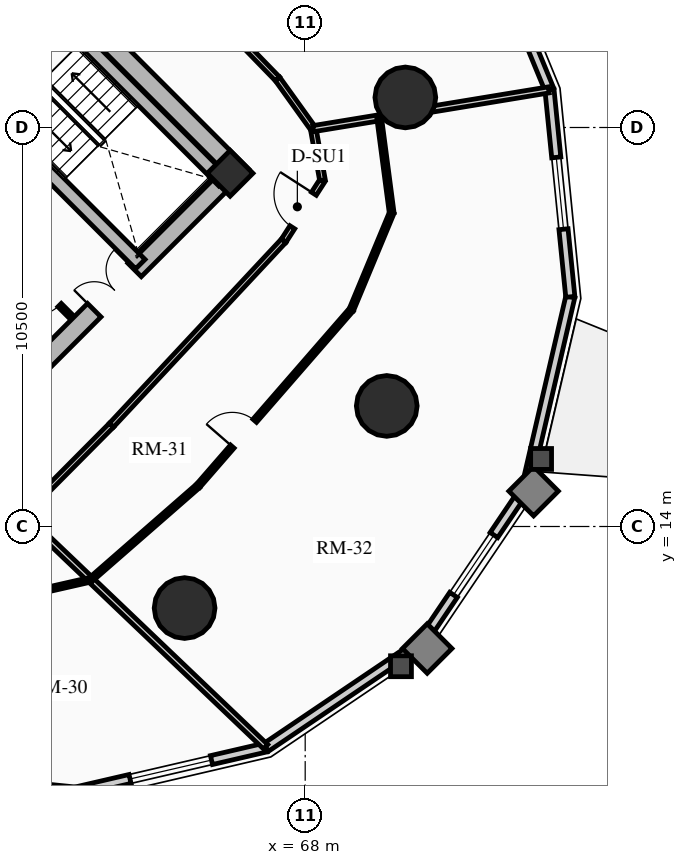
"""IFC4 building model, lengths in metres.
Left out: names, types, materials, properties, quantities, classifications, styles, units other than length and angle.
Written with IfcOpenShell. Run it as: python <this file> out.ifc"""

import sys

from ifc_helpers import new_model, si_unit, direction, frame, frame_2d, origin, origin_2d, place, context, subcontext, project, spatial, rectangle, circle, extrude, source, transform, mapped, element, fill, save


model = new_model("IFC4")
c1 = context("Model", 3, precision=1e-05, world=origin(), true_north=direction((0.0, 1.0)))
c2 = subcontext(c1, "Body", "Model", "MODEL_VIEW")
j1 = project(units=[si_unit("LENGTHUNIT", "METRE"), si_unit("PLANEANGLEUNIT", "RADIAN")], contexts=[c1])
p1 = place(None, origin())
s1 = spatial("IfcSite", under=j1, at=p1, CompositionType="ELEMENT")
p2 = place(p1, origin())
s2 = spatial("IfcBuilding", under=s1, at=p2, CompositionType="ELEMENT")
p3 = place(p2, frame((0.0, 0.0, 56.92)))
s3 = spatial("IfcBuildingStorey", under=s2, at=p3, CompositionType="ELEMENT", Elevation=56.92)
p4 = place(p3, frame((66.339, 23.227, 0.0), z_axis=(0.0, 0.0, 1.0), x_axis=(-0.707106781187, 0.707106781187, 0.0)))
e1 = element("IfcWall", 1, at=p4, inside=s3, PredefinedType="SHEAR", context=c2, shape_type="SweptSolid", body=[
    extrude(rectangle(XDim=14.3, YDim=0.5, at=frame_2d((7.15, 0.0))), origin(), (0.0, 0.0, 1.0), 2.91),
])
p5 = place(p3, frame((58.596, 15.838, 0.0), z_axis=(0.0, 0.0, 1.0), x_axis=(0.707106781187, 0.707106781187, 0.0)))
e2 = element("IfcWall", 2, at=p5, inside=s3, PredefinedType="SHEAR", context=c2, shape_type="SweptSolid", body=[
    extrude(rectangle(XDim=10.7, YDim=0.5, at=frame_2d((5.35, 0.0))), origin(), (0.0, 0.0, 1.0), 2.91),
])
m1 = source(origin(), c2, "Body", "SweptSolid", [
    extrude(rectangle(XDim=1.5, YDim=2.02, at=frame_2d((0.75, 1.01))), frame((0.0, 0.26, 0.0), z_axis=(0.0, -1.0, 0.0), x_axis=(1.0, 0.0, 0.0)), (0.0, 0.0, 1.0), 0.52),
])
p6 = place(p5, frame((5.45, 0.0, 0.0)))
e3 = element("IfcOpeningElement", 3, at=p6, cuts=e2, PredefinedType="OPENING", context=c2, shape_type="MappedRepresentation", body=[
    mapped(m1, transform((0.0, 0.0, 0.0), x_axis=(1.0, 0.0, 0.0), y_axis=(0.0, 1.0, 0.0), z_axis=(0.0, 0.0, 1.0), scale=1.0)),
])
p7 = place(p3, frame((63.662, 20.904, 0.0), z_axis=(0.0, 0.0, 1.0), x_axis=(-0.707106781187, 0.707106781187, 0.0)))
e4 = element("IfcWall", 4, at=p7, inside=s3, PredefinedType="SHEAR", context=c2, shape_type="SweptSolid", body=[
    extrude(rectangle(XDim=13.8, YDim=0.35, at=frame_2d((6.9, 0.0))), origin(), (0.0, 0.0, 1.0), 2.91),
])
m2 = source(origin(), c2, "Body", "SweptSolid", [
    extrude(rectangle(XDim=1.1, YDim=2.015, at=frame_2d((0.55, 1.007))), frame((0.0, 0.185, 0.0), z_axis=(0.0, -1.0, 0.0), x_axis=(1.0, 0.0, 0.0)), (0.0, 0.0, 1.0), 0.37),
])
p8 = place(p7, frame((10.025, 0.0, 0.0)))
e5 = element("IfcOpeningElement", 5, at=p8, cuts=e4, PredefinedType="OPENING", context=c2, shape_type="MappedRepresentation", body=[
    mapped(m2, transform((0.0, 0.0, 0.0), x_axis=(1.0, 0.0, 0.0), y_axis=(0.0, 1.0, 0.0), z_axis=(0.0, 0.0, 1.0), scale=1.0)),
])
p9 = place(p7, frame((12.025, 0.0, 0.0)))
e6 = element("IfcOpeningElement", 6, at=p9, cuts=e4, PredefinedType="OPENING", context=c2, shape_type="MappedRepresentation", body=[
    mapped(m2, transform((0.0, 0.0, 0.0), x_axis=(1.0, 0.0, 0.0), y_axis=(0.0, 1.0, 0.0), z_axis=(0.0, 0.0, 1.0), scale=1.0)),
])
m3 = source(origin(), c2, "Body", "SweptSolid", [
    extrude(rectangle(XDim=1.15, YDim=2.02, at=frame_2d((0.575, 1.01))), frame((0.0, 0.185, 0.0), z_axis=(0.0, -1.0, 0.0), x_axis=(1.0, 0.0, 0.0)), (0.0, 0.0, 1.0), 0.37),
])
p10 = place(p7, frame((5.33, 0.0, 0.0)))
e7 = element("IfcOpeningElement", 7, at=p10, cuts=e4, PredefinedType="OPENING", context=c2, shape_type="MappedRepresentation", body=[
    mapped(m3, transform((0.0, 0.0, 0.0), x_axis=(1.0, 0.0, 0.0), y_axis=(0.0, 1.0, 0.0), z_axis=(0.0, 0.0, 1.0), scale=1.0)),
])
p11 = place(p3, frame((65.847, 23.089, 0.0), z_axis=(0.0, 0.0, 1.0), x_axis=(-0.707106781187, 0.707106781187, 0.0)))
e8 = element("IfcWall", 8, at=p11, inside=s3, PredefinedType="SHEAR", context=c2, shape_type="SweptSolid", body=[
    extrude(rectangle(XDim=6.745, YDim=0.35, at=frame_2d((3.373, 0.0))), origin(), (0.0, 0.0, 1.0), 2.91),
])
p12 = place(p3, frame((66.024, 23.294, 0.0), z_axis=(0.0, 0.0, 1.0), x_axis=(0.707106781187, 0.707106781187, 0.0)))
e9 = element("IfcColumn", 9, at=p12, inside=s3, PredefinedType="COLUMN", context=c2, shape_type="SweptSolid", body=[
    extrude(rectangle(XDim=0.85, YDim=0.85, at=origin_2d()), origin(), (0.0, 0.0, 1.0), 2.91),
])
for number, where, z_axis, x_axis in (
    (10, (64.827, 11.854, 0.0), (0.0, 0.0, 1.0), (1.0, 0.0, 0.0)),
    (11, (70.146, 17.173, 0.0), (0.0, 0.0, 1.0), (1.0, 0.0, 0.0)),
    (12, (70.635, 25.291, 0.0), (0.0, 0.0, 1.0), (1.0, 0.0, 0.0)),
):
    element("IfcColumn", number, at=place(p3, frame(where, z_axis=z_axis, x_axis=x_axis)), inside=s3, PredefinedType="USERDEFINED", context=c2, shape_type="SweptSolid", body=[
        extrude(circle(Radius=0.8, at=origin_2d()), origin(), (0.0, 0.0, 1.0), 2.91),
    ])
p13 = place(p3, frame((61.957, 7.024, 0.0), z_axis=(0.0, 0.0, 1.0), x_axis=(-0.994970765694, 0.100165739718, 0.0)))
e13 = element("IfcWall", 13, at=p13, inside=s3, PredefinedType="SOLIDWALL", context=c2, shape_type="SweptSolid", body=[
    extrude(rectangle(XDim=5.477, YDim=0.24, at=frame_2d((2.738, 0.0))), origin(), (0.0, 0.0, 1.0), 2.073),
])
m4 = source(origin(), c2, "Body", "SweptSolid", [
    extrude(rectangle(XDim=1.9, YDim=1.35, at=frame_2d((0.95, 0.675))), frame((0.0, 0.13, 0.0), z_axis=(0.0, -1.0, 0.0), x_axis=(1.0, 0.0, 0.0)), (0.0, 0.0, 1.0), 0.26),
])
p14 = place(p13, frame((1.788, 0.0, 0.65)))
e14 = element("IfcOpeningElement", 14, at=p14, cuts=e13, PredefinedType="OPENING", context=c2, shape_type="MappedRepresentation", body=[
    mapped(m4, transform((0.0, 0.0, 0.0), x_axis=(1.0, 0.0, 0.0), y_axis=(0.0, 1.0, 0.0), z_axis=(0.0, 0.0, 1.0), scale=1.0)),
])
p15 = place(p3, frame((66.969, 8.186, 0.0), z_axis=(0.0, 0.0, 1.0), x_axis=(-0.974166016949, -0.225833060959, 0.0)))
e15 = element("IfcWall", 15, at=p15, inside=s3, PredefinedType="SOLIDWALL", context=c2, shape_type="SweptSolid", body=[
    extrude(rectangle(XDim=5.146, YDim=0.24, at=frame_2d((2.573, 0.0))), origin(), (0.0, 0.0, 1.0), 2.073),
])
m5 = source(origin(), c2, "Body", "SweptSolid", [
    extrude(rectangle(XDim=2.2, YDim=1.35, at=frame_2d((1.1, 0.675))), frame((0.0, 0.13, 0.0), z_axis=(0.0, -1.0, 0.0), x_axis=(1.0, 0.0, 0.0)), (0.0, 0.0, 1.0), 0.26),
])
p16 = place(p15, frame((1.473, 0.0, 0.65)))
e16 = element("IfcOpeningElement", 16, at=p16, cuts=e15, PredefinedType="OPENING", context=c2, shape_type="MappedRepresentation", body=[
    mapped(m5, transform((0.0, 0.0, 0.0), x_axis=(1.0, 0.0, 0.0), y_axis=(0.0, 1.0, 0.0), z_axis=(0.0, 0.0, 1.0), scale=1.0)),
])
p17 = place(p3, frame((71.055, 10.945, 0.0), z_axis=(0.0, 0.0, 1.0), x_axis=(-0.828736708604, -0.559638693991, 0.0)))
e17 = element("IfcWall", 17, at=p17, inside=s3, PredefinedType="SOLIDWALL", context=c2, shape_type="SweptSolid", body=[
    extrude(rectangle(XDim=4.93, YDim=0.24, at=frame_2d((2.465, 0.0))), origin(), (0.0, 0.0, 1.0), 2.073),
])
p18 = place(p3, frame((73.814, 15.031, 0.0), z_axis=(0.0, 0.0, 1.0), x_axis=(-0.559638693991, -0.828736708604, 0.0)))
e18 = element("IfcWall", 18, at=p18, inside=s3, PredefinedType="SOLIDWALL", context=c2, shape_type="SweptSolid", body=[
    extrude(rectangle(XDim=4.93, YDim=0.24, at=frame_2d((2.465, 0.0))), origin(), (0.0, 0.0, 1.0), 2.073),
])
p19 = place(p18, frame((1.515, 0.0, 0.65)))
e19 = element("IfcOpeningElement", 19, at=p19, cuts=e18, PredefinedType="OPENING", context=c2, shape_type="MappedRepresentation", body=[
    mapped(m4, transform((0.0, 0.0, 0.0), x_axis=(1.0, 0.0, 0.0), y_axis=(0.0, 1.0, 0.0), z_axis=(0.0, 0.0, 1.0), scale=1.0)),
])
p20 = place(p3, frame((74.976, 20.043, 0.0), z_axis=(0.0, 0.0, 1.0), x_axis=(-0.225833060959, -0.974166016949, 0.0)))
e20 = element("IfcWall", 20, at=p20, inside=s3, PredefinedType="SOLIDWALL", context=c2, shape_type="SweptSolid", body=[
    extrude(rectangle(XDim=5.146, YDim=0.24, at=frame_2d((2.573, 0.0))), origin(), (0.0, 0.0, 1.0), 2.073),
])
p21 = place(p3, frame((74.428, 25.493, 0.0), z_axis=(0.0, 0.0, 1.0), x_axis=(0.100165739718, -0.994970765694, 0.0)))
e21 = element("IfcWall", 21, at=p21, inside=s3, PredefinedType="SOLIDWALL", context=c2, shape_type="SweptSolid", body=[
    extrude(rectangle(XDim=5.477, YDim=0.24, at=frame_2d((2.738, 0.0))), origin(), (0.0, 0.0, 1.0), 2.073),
])
p22 = place(p21, frame((1.788, 0.0, 0.65)))
e22 = element("IfcOpeningElement", 22, at=p22, cuts=e21, PredefinedType="OPENING", context=c2, shape_type="MappedRepresentation", body=[
    mapped(m4, transform((0.0, 0.0, 0.0), x_axis=(1.0, 0.0, 0.0), y_axis=(0.0, 1.0, 0.0), z_axis=(0.0, 0.0, 1.0), scale=1.0)),
])
p23 = place(p3, frame((72.222, 30.844, 0.0), z_axis=(0.0, 0.0, 1.0), x_axis=(0.381027682565, -0.924563629567, 0.0)))
e23 = element("IfcWall", 23, at=p23, inside=s3, PredefinedType="SOLIDWALL", context=c2, shape_type="SweptSolid", body=[
    extrude(rectangle(XDim=5.789, YDim=0.24, at=frame_2d((2.894, 0.0))), origin(), (0.0, 0.0, 1.0), 2.073),
])
p24 = place(p3, frame((61.835, 19.529, 0.0), z_axis=(0.0, 0.0, 1.0), x_axis=(-0.707174592913, 0.707038962956, 0.0)))
e24 = element("IfcWall", 24, at=p24, inside=s3, PredefinedType="PARTITIONING", context=c2, shape_type="SweptSolid", body=[
    extrude(rectangle(XDim=1.8, YDim=0.125, at=frame_2d((0.9, 0.0))), origin(), (0.0, 0.0, 1.0), 2.635),
])
m6 = source(origin(), c2, "Body", "SweptSolid", [
    extrude(rectangle(XDim=0.9, YDim=2.005, at=frame_2d((0.45, 1.002))), frame((0.0, 0.073, 0.0), z_axis=(0.0, -1.0, 0.0), x_axis=(1.0, 0.0, 0.0)), (0.0, 0.0, 1.0), 0.145),
])
p25 = place(p24, frame((0.42, 0.0, 0.0)))
e25 = element("IfcOpeningElement", 25, at=p25, cuts=e24, PredefinedType="OPENING", context=c2, shape_type="MappedRepresentation", body=[
    mapped(m6, transform((0.0, 0.0, 0.0), x_axis=(1.0, 0.0, 0.0), y_axis=(0.0, 1.0, 0.0), z_axis=(0.0, 0.0, 1.0), scale=1.0)),
])
p26 = place(p3, frame((60.562, 14.31, 0.0), z_axis=(0.0, 0.0, 1.0), x_axis=(0.704566236161, 0.709638230975, 0.0)))
e26 = element("IfcWall", 26, at=p26, inside=s3, PredefinedType="PARTITIONING", context=c2, shape_type="SweptSolid", body=[
    extrude(rectangle(XDim=3.321, YDim=0.15, at=frame_2d((1.661, 0.0))), origin(), (0.0, 0.0, 1.0), 2.159),
])
p27 = place(p3, frame((62.903, 16.667, 0.0), z_axis=(0.0, 0.0, 1.0), x_axis=(0.682371947497, 0.731005147225, 0.0)))
e27 = element("IfcWall", 27, at=p27, inside=s3, PredefinedType="PARTITIONING", context=c2, shape_type="SweptSolid", body=[
    extrude(rectangle(XDim=6.642, YDim=0.15, at=frame_2d((3.321, 0.0))), origin(), (0.0, 0.0, 1.0), 2.159),
])
p28 = place(p3, frame((67.435, 21.521, 0.0), z_axis=(0.0, 0.0, 1.0), x_axis=(0.540777197838, 0.841165870859, 0.0)))
e28 = element("IfcWall", 28, at=p28, inside=s3, PredefinedType="PARTITIONING", context=c2, shape_type="SweptSolid", body=[
    extrude(rectangle(XDim=1.888, YDim=0.15, at=frame_2d((0.944, 0.0))), origin(), (0.0, 0.0, 1.0), 2.205),
])
m7 = source(origin(), c2, "Body", "SweptSolid", [
    extrude(rectangle(XDim=1.05, YDim=2.015, at=frame_2d((0.525, 1.007))), frame((0.0, 0.085, 0.0), z_axis=(0.0, -1.0, 0.0), x_axis=(1.0, 0.0, 0.0)), (0.0, 0.0, 1.0), 0.17),
])
p29 = place(p28, frame((0.419, 0.0, 0.0)))
e29 = element("IfcOpeningElement", 29, at=p29, cuts=e28, PredefinedType="OPENING", context=c2, shape_type="MappedRepresentation", body=[
    mapped(m7, transform((0.0, 0.0, 0.0), x_axis=(1.0, 0.0, 0.0), y_axis=(0.0, 1.0, 0.0), z_axis=(0.0, 0.0, 1.0), scale=1.0)),
])
p30 = place(p3, frame((68.456, 23.11, 0.0), z_axis=(0.0, 0.0, 1.0), x_axis=(-0.1772522795, 0.984165448191, 0.0)))
e30 = element("IfcWall", 30, at=p30, inside=s3, PredefinedType="PARTITIONING", context=c2, shape_type="SweptSolid", body=[
    extrude(rectangle(XDim=1.382, YDim=0.15, at=frame_2d((0.691, 0.0))), origin(), (0.0, 0.0, 1.0), 2.159),
])
p31 = place(p3, frame((68.211, 24.469, 0.0), z_axis=(0.0, 0.0, 1.0), x_axis=(-0.583012141368, 0.812463441034, 0.0)))
e31 = element("IfcWall", 31, at=p31, inside=s3, PredefinedType="PARTITIONING", context=c2, shape_type="SweptSolid", body=[
    extrude(rectangle(XDim=1.613, YDim=0.15, at=frame_2d((0.807, 0.0))), origin(), (0.0, 0.0, 1.0), 2.205),
])
p32 = place(p3, frame((67.27, 25.78, 0.0), z_axis=(0.0, 0.0, 1.0), x_axis=(-0.696847842907, 0.717218992942, 0.0)))
e32 = element("IfcWall", 32, at=p32, inside=s3, PredefinedType="PARTITIONING", context=c2, shape_type="SweptSolid", body=[
    extrude(rectangle(XDim=6.004, YDim=0.15, at=frame_2d((3.002, 0.0))), origin(), (0.0, 0.0, 1.0), 2.635),
])
m8 = source(origin(), c2, "Body", "SweptSolid", [
    extrude(rectangle(XDim=1.0, YDim=2.015, at=frame_2d((0.5, 1.007))), frame((0.0, 0.085, 0.0), z_axis=(0.0, -1.0, 0.0), x_axis=(1.0, 0.0, 0.0)), (0.0, 0.0, 1.0), 0.17),
])
p33 = place(p32, frame((2.502, 0.0, 0.0)))
e33 = element("IfcOpeningElement", 33, at=p33, cuts=e32, PredefinedType="OPENING", context=c2, shape_type="MappedRepresentation", body=[
    mapped(m8, transform((0.0, 0.0, 0.0), x_axis=(1.0, 0.0, 0.0), y_axis=(0.0, 1.0, 0.0), z_axis=(0.0, 0.0, 1.0), scale=1.0)),
])
p34 = place(p3, frame((60.562, 14.31, 0.0), z_axis=(0.0, 0.0, 1.0), x_axis=(0.723408813637, -0.690419936236, 0.0)))
e34 = element("IfcWall", 34, at=p34, inside=s3, PredefinedType="PARTITIONING", context=c2, shape_type="SweptSolid", body=[
    extrude(rectangle(XDim=8.844, YDim=0.16, at=frame_2d((4.422, 0.0))), origin(), (0.0, 0.0, 1.0), 2.073),
])
p35 = place(p3, frame((68.211, 24.469, 0.0), z_axis=(0.0, 0.0, 1.0), x_axis=(0.986718695255, 0.162438346562, 0.0)))
e35 = element("IfcWall", 35, at=p35, inside=s3, PredefinedType="PARTITIONING", context=c2, shape_type="SweptSolid", body=[
    extrude(rectangle(XDim=6.281, YDim=0.16, at=frame_2d((3.141, 0.0))), origin(), (0.0, 0.0, 1.0), 2.073),
])
p36 = place(p3, frame((59.833, 12.025, 0.0), z_axis=(0.0, 0.0, 1.0), x_axis=(0.975011214108, 0.222155648959, 0.0)))
e36 = element("IfcWall", 36, at=p36, inside=s3, PredefinedType="PARTITIONING", context=c2, shape_type="SweptSolid", body=[
    extrude(rectangle(XDim=2.586, YDim=0.125, at=frame_2d((1.293, 0.0))), origin(), (0.0, 0.0, 1.0), 2.205),
])
p37 = place(p3, frame((62.354, 12.6, 0.0), z_axis=(0.0, 0.0, 1.0), x_axis=(0.75329750535, 0.657679913357, 0.0)))
e37 = element("IfcWall", 37, at=p37, inside=s3, PredefinedType="PARTITIONING", context=c2, shape_type="SweptSolid", body=[
    extrude(rectangle(XDim=3.753, YDim=0.125, at=frame_2d((1.877, 0.0))), origin(), (0.0, 0.0, 1.0), 2.159),
])
p38 = place(p3, frame((65.181, 15.068, 0.0), z_axis=(0.0, 0.0, 1.0), x_axis=(0.656272116637, 0.754524293131, 0.0)))
e38 = element("IfcWall", 38, at=p38, inside=s3, PredefinedType="PARTITIONING", context=c2, shape_type="SweptSolid", body=[
    extrude(rectangle(XDim=6.147, YDim=0.125, at=frame_2d((3.074, 0.0))), origin(), (0.0, 0.0, 1.0), 2.159),
])
p39 = place(p38, frame((1.372, 0.0, 0.0)))
e39 = element("IfcOpeningElement", 39, at=p39, cuts=e38, PredefinedType="OPENING", context=c2, shape_type="MappedRepresentation", body=[
    mapped(m6, transform((0.0, 0.0, 0.0), x_axis=(1.0, 0.0, 0.0), y_axis=(0.0, 1.0, 0.0), z_axis=(0.0, 0.0, 1.0), scale=1.0)),
])
p40 = place(p3, frame((69.216, 19.707, 0.0), z_axis=(0.0, 0.0, 1.0), x_axis=(0.384483341888, 0.923131929797, 0.0)))
e40 = element("IfcWall", 40, at=p40, inside=s3, PredefinedType="PARTITIONING", context=c2, shape_type="SweptSolid", body=[
    extrude(rectangle(XDim=2.757, YDim=0.125, at=frame_2d((1.378, 0.0))), origin(), (0.0, 0.0, 1.0), 2.205),
])
p41 = place(p3, frame((70.276, 22.252, 0.0), z_axis=(0.0, 0.0, 1.0), x_axis=(-0.130649633398, 0.991428602217, 0.0)))
e41 = element("IfcWall", 41, at=p41, inside=s3, PredefinedType="PARTITIONING", context=c2, shape_type="SweptSolid", body=[
    extrude(rectangle(XDim=2.525, YDim=0.125, at=frame_2d((1.262, 0.0))), origin(), (0.0, 0.0, 1.0), 2.073),
])
m9 = source(origin(), c2, "Body", "SweptSolid", [
    extrude(rectangle(XDim=2.2, YDim=1.35, at=frame_2d((1.1, 0.675))), frame((0.0, 0.03, 0.0), z_axis=(0.0, -1.0, 0.0), x_axis=(1.0, 0.0, 0.0)), (0.0, 0.0, 1.0), 0.06),
])
p42 = place(p16, origin())
e42 = element("IfcWindow", 42, at=p42, inside=s3, PartitioningType="DOUBLE_PANEL_VERTICAL", PredefinedType="WINDOW", context=c2, shape_type="MappedRepresentation", body=[
    mapped(m9, transform((0.0, 0.0, 0.0), x_axis=(1.0, 0.0, 0.0), y_axis=(0.0, 1.0, 0.0), z_axis=(0.0, 0.0, 1.0), scale=1.0)),
])
fill(e16, e42)
m10 = source(origin(), c2, "Body", "SweptSolid", [
    extrude(rectangle(XDim=1.9, YDim=1.35, at=frame_2d((0.95, 0.675))), frame((0.0, 0.03, 0.0), z_axis=(0.0, -1.0, 0.0), x_axis=(1.0, 0.0, 0.0)), (0.0, 0.0, 1.0), 0.06),
])
p43 = place(p19, origin())
e43 = element("IfcWindow", 43, at=p43, inside=s3, PartitioningType="DOUBLE_PANEL_VERTICAL", PredefinedType="WINDOW", context=c2, shape_type="MappedRepresentation", body=[
    mapped(m10, transform((0.0, 0.0, 0.0), x_axis=(1.0, 0.0, 0.0), y_axis=(0.0, 1.0, 0.0), z_axis=(0.0, 0.0, 1.0), scale=1.0)),
])
fill(e19, e43)
p44 = place(p22, origin())
e44 = element("IfcWindow", 44, at=p44, inside=s3, PartitioningType="DOUBLE_PANEL_VERTICAL", PredefinedType="WINDOW", context=c2, shape_type="MappedRepresentation", body=[
    mapped(m10, transform((0.0, 0.0, 0.0), x_axis=(1.0, 0.0, 0.0), y_axis=(0.0, 1.0, 0.0), z_axis=(0.0, 0.0, 1.0), scale=1.0)),
])
fill(e22, e44)
m11 = source(origin(), c2, "Body", "SweptSolid", [
    extrude(rectangle(XDim=1.5, YDim=2.02, at=frame_2d((0.75, 1.01))), frame((0.0, 0.025, 0.0), z_axis=(0.0, -1.0, 0.0), x_axis=(1.0, 0.0, 0.0)), (0.0, 0.0, 1.0), 0.05),
])
p45 = place(p6, origin())
e45 = element("IfcDoor", 45, at=p45, inside=s3, OperationType="DOUBLE_DOOR_SINGLE_SWING", PredefinedType="DOOR", context=c2, shape_type="MappedRepresentation", body=[
    mapped(m11, transform((0.0, 0.0, 0.0), x_axis=(1.0, 0.0, 0.0), y_axis=(0.0, 1.0, 0.0), z_axis=(0.0, 0.0, 1.0), scale=1.0)),
])
fill(e3, e45)
m12 = source(origin(), c2, "Body", "SweptSolid", [
    extrude(rectangle(XDim=0.9, YDim=2.005, at=frame_2d((0.45, 1.002))), frame((0.0, 0.025, 0.0), z_axis=(0.0, -1.0, 0.0), x_axis=(1.0, 0.0, 0.0)), (0.0, 0.0, 1.0), 0.05),
])
p46 = place(p25, origin())
e46 = element("IfcDoor", 46, at=p46, inside=s3, OperationType="SINGLE_SWING_RIGHT", PredefinedType="DOOR", context=c2, shape_type="MappedRepresentation", body=[
    mapped(m12, transform((0.0, 0.0, 0.0), x_axis=(1.0, 0.0, 0.0), y_axis=(0.0, 1.0, 0.0), z_axis=(0.0, 0.0, 1.0), scale=1.0)),
])
fill(e25, e46)
m13 = source(origin(), c2, "Body", "SweptSolid", [
    extrude(rectangle(XDim=1.05, YDim=2.015, at=frame_2d((0.525, 1.007))), frame((0.0, 0.025, 0.0), z_axis=(0.0, -1.0, 0.0), x_axis=(1.0, 0.0, 0.0)), (0.0, 0.0, 1.0), 0.05),
])
p47 = place(p29, origin())
e47 = element("IfcDoor", 47, at=p47, inside=s3, OperationType="SINGLE_SWING_RIGHT", PredefinedType="DOOR", context=c2, shape_type="MappedRepresentation", body=[
    mapped(m13, transform((0.0, 0.0, 0.0), x_axis=(1.0, 0.0, 0.0), y_axis=(0.0, 1.0, 0.0), z_axis=(0.0, 0.0, 1.0), scale=1.0)),
])
fill(e29, e47)
p48 = place(p39, origin())
e48 = element("IfcDoor", 48, at=p48, inside=s3, OperationType="SINGLE_SWING_LEFT", PredefinedType="DOOR", context=c2, shape_type="MappedRepresentation", body=[
    mapped(m12, transform((0.0, 0.0, 0.0), x_axis=(1.0, 0.0, 0.0), y_axis=(0.0, 1.0, 0.0), z_axis=(0.0, 0.0, 1.0), scale=1.0)),
])
fill(e39, e48)
save(model, sys.argv[1])
